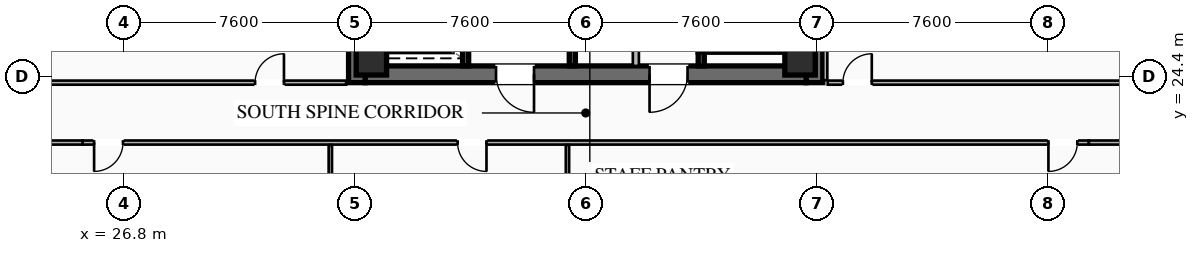
"""IFC4 building model, lengths in metres.
Left out: names, types, materials, properties, quantities, classifications, styles, units other than length and angle.
Written with IfcOpenShell. Run it as: python <this file> out.ifc"""

import sys

from ifc_helpers import new_model, si_unit, direction, frame, frame_2d, origin, origin_2d, place, context, subcontext, project, spatial, rectangle, hollow_rectangle, extrude, element, fill, save


model = new_model("IFC4")
c1 = context("Model", 3, precision=1e-05, world=origin(), true_north=direction((0.0, 1.0)))
c2 = subcontext(c1, "Body", "Model", "MODEL_VIEW")
j1 = project(units=[si_unit("LENGTHUNIT", "METRE"), si_unit("PLANEANGLEUNIT", "RADIAN")], contexts=[c1])
p1 = place(None, origin())
s1 = spatial("IfcSite", under=j1, at=p1, CompositionType="ELEMENT")
p2 = place(p1, origin())
s2 = spatial("IfcBuilding", under=s1, at=p2, CompositionType="ELEMENT")
p3 = place(p2, frame((0.0, 0.0, 149.9)))
s3 = spatial("IfcBuildingStorey", under=s2, at=p3, CompositionType="ELEMENT", Elevation=149.9)
for number, where, z_axis, x_axis in (
    (1, (34.475, 24.2, 0.0), (0.0, 0.0, 1.0), (0.0, 1.0, 0.0)),
    (2, (49.525, 39.8, 0.0), (0.0, 0.0, 1.0), (0.0, -1.0, 0.0)),
):
    element("IfcWall", number, at=place(p3, frame(where, z_axis=z_axis, x_axis=x_axis)), inside=s3, PredefinedType="SHEAR", context=c2, shape_type="SweptSolid", body=[
        extrude(rectangle(XDim=15.6, YDim=0.55, at=frame_2d((7.8, 0.0))), origin(), (0.0, 0.0, 1.0), 3.55),
    ])
p4 = place(p3, frame((49.25, 24.475, 0.0), z_axis=(0.0, 0.0, 1.0), x_axis=(-1.0, 0.0, 0.0)))
e3 = element("IfcWall", 3, at=p4, inside=s3, PredefinedType="SHEAR", context=c2, shape_type="SweptSolid", body=[
    extrude(rectangle(XDim=14.5, YDim=0.55, at=frame_2d((7.25, 0.0))), origin(), (0.0, 0.0, 1.0), 3.55),
])
p5 = place(p4, frame((8.95, 0.0, 0.0)))
e4 = element("IfcOpeningElement", 4, at=p5, cuts=e3, PredefinedType="OPENING", context=c2, shape_type="SweptSolid", body=[
    extrude(rectangle(XDim=1.25, YDim=2.25, at=frame_2d((0.625, 1.125))), frame((0.0, 0.285, 0.0), z_axis=(0.0, -1.0, 0.0), x_axis=(1.0, 0.0, 0.0)), (0.0, 0.0, 1.0), 0.57),
])
p6 = place(p4, frame((3.9, 0.0, 0.0)))
e5 = element("IfcOpeningElement", 5, at=p6, cuts=e3, PredefinedType="OPENING", context=c2, shape_type="SweptSolid", body=[
    extrude(rectangle(XDim=1.25, YDim=2.25, at=frame_2d((0.625, 1.125))), frame((0.0, 0.285, 0.0), z_axis=(0.0, -1.0, 0.0), x_axis=(1.0, 0.0, 0.0)), (0.0, 0.0, 1.0), 0.57),
])
for number, where, z_axis, x_axis in (
    (6, (34.95, 24.95, 0.0), (0.0, 0.0, 1.0), (1.0, 0.0, 0.0)),
    (7, (49.05, 24.95, 0.0), (0.0, 0.0, 1.0), (1.0, 0.0, 0.0)),
):
    element("IfcColumn", number, at=place(p3, frame(where, z_axis=z_axis, x_axis=x_axis)), inside=s3, PredefinedType="COLUMN", context=c2, shape_type="SweptSolid", body=[
        extrude(hollow_rectangle(XDim=1.0, YDim=1.0, WallThickness=0.04, at=origin_2d()), origin(), (0.0, 0.0, 1.0), 3.37),
    ])
p7 = place(p3, frame((45.8, 32.8, 0.0), z_axis=(0.0, 0.0, 1.0), x_axis=(0.0, -1.0, 0.0)))
e8 = element("IfcWall", 8, at=p7, inside=s3, PredefinedType="SHEAR", context=c2, shape_type="SweptSolid", body=[
    extrude(rectangle(XDim=8.05, YDim=0.2, at=frame_2d((4.025, 0.0))), origin(), (0.0, 0.0, 1.0), 3.37),
])
p8 = place(p7, frame((0.45, 0.0, 0.0)))
e9 = element("IfcOpeningElement", 9, at=p8, cuts=e8, PredefinedType="OPENING", context=c2, shape_type="SweptSolid", body=[
    extrude(rectangle(XDim=1.15, YDim=2.2, at=frame_2d((0.575, 1.1))), frame((0.0, 0.11, 0.0), z_axis=(0.0, -1.0, 0.0), x_axis=(1.0, 0.0, 0.0)), (0.0, 0.0, 1.0), 0.22),
])
p9 = place(p3, frame((41.56, 24.75, 0.0), z_axis=(0.0, 0.0, 1.0), x_axis=(0.0, 1.0, 0.0)))
e10 = element("IfcWall", 10, at=p9, inside=s3, PredefinedType="SHEAR", context=c2, shape_type="SweptSolid", body=[
    extrude(rectangle(XDim=14.5, YDim=0.2, at=frame_2d((7.25, 0.0))), origin(), (0.0, 0.0, 1.0), 3.37),
])
p10 = place(p3, frame((38.05, 24.75, 0.0), z_axis=(0.0, 0.0, 1.0), x_axis=(0.0, 1.0, 0.0)))
e11 = element("IfcWall", 11, at=p10, inside=s3, PredefinedType="SHEAR", context=c2, shape_type="SweptSolid", body=[
    extrude(rectangle(XDim=6.45, YDim=0.2, at=frame_2d((3.225, 0.0))), origin(), (0.0, 0.0, 1.0), 3.37),
])
p11 = place(p10, frame((4.875, 0.0, 0.0)))
e12 = element("IfcOpeningElement", 12, at=p11, cuts=e11, PredefinedType="OPENING", context=c2, shape_type="SweptSolid", body=[
    extrude(rectangle(XDim=1.3, YDim=2.25, at=frame_2d((0.65, 1.125))), frame((0.0, 0.11, 0.0), z_axis=(0.0, -1.0, 0.0), x_axis=(1.0, 0.0, 0.0)), (0.0, 0.0, 1.0), 0.22),
])
p12 = place(p10, frame((2.875, 0.0, 0.0)))
e13 = element("IfcOpeningElement", 13, at=p12, cuts=e11, PredefinedType="OPENING", context=c2, shape_type="SweptSolid", body=[
    extrude(rectangle(XDim=1.3, YDim=2.25, at=frame_2d((0.65, 1.125))), frame((0.0, 0.11, 0.0), z_axis=(0.0, -1.0, 0.0), x_axis=(1.0, 0.0, 0.0)), (0.0, 0.0, 1.0), 0.22),
])
p13 = place(p10, frame((0.675, 0.0, 0.0)))
e14 = element("IfcOpeningElement", 14, at=p13, cuts=e11, PredefinedType="OPENING", context=c2, shape_type="SweptSolid", body=[
    extrude(rectangle(XDim=1.3, YDim=2.25, at=frame_2d((0.65, 1.125))), frame((0.0, 0.11, 0.0), z_axis=(0.0, -1.0, 0.0), x_axis=(1.0, 0.0, 0.0)), (0.0, 0.0, 1.0), 0.22),
])
p14 = place(p3, frame((43.65, 24.75, 0.0), z_axis=(0.0, 0.0, 1.0), x_axis=(0.0, 1.0, 0.0)))
e15 = element("IfcWall", 15, at=p14, inside=s3, PredefinedType="SOLIDWALL", context=c2, shape_type="SweptSolid", body=[
    extrude(rectangle(XDim=6.9, YDim=0.2, at=frame_2d((3.45, 0.0))), origin(), (0.0, 0.0, 1.0), 2.723),
])
p15 = place(p14, frame((0.85, 0.0, 0.0)))
e16 = element("IfcOpeningElement", 16, at=p15, cuts=e15, PredefinedType="OPENING", context=c2, shape_type="SweptSolid", body=[
    extrude(rectangle(XDim=0.95, YDim=2.05, at=frame_2d((0.475, 1.025))), frame((0.0, 0.11, 0.0), z_axis=(0.0, -1.0, 0.0), x_axis=(1.0, 0.0, 0.0)), (0.0, 0.0, 1.0), 0.22),
])
p16 = place(p14, frame((4.8, 0.0, 0.0)))
e17 = element("IfcOpeningElement", 17, at=p16, cuts=e15, PredefinedType="OPENING", context=c2, shape_type="SweptSolid", body=[
    extrude(rectangle(XDim=1.05, YDim=2.2, at=frame_2d((0.525, 1.1))), frame((0.0, 0.11, 0.0), z_axis=(0.0, -1.0, 0.0), x_axis=(1.0, 0.0, 0.0)), (0.0, 0.0, 1.0), 0.22),
])
p17 = place(p3, frame((58.55, 22.23, 0.0), z_axis=(0.0, 0.0, 1.0), x_axis=(-1.0, 0.0, 0.0)))
e18 = element("IfcWall", 18, at=p17, inside=s3, PredefinedType="PARTITIONING", context=c2, shape_type="SweptSolid", body=[
    extrude(rectangle(XDim=33.1, YDim=0.135, at=frame_2d((16.55, 0.0))), origin(), (0.0, 0.0, 1.0), 2.723),
])
p18 = place(p17, frame((31.77, 0.0, 0.0)))
e19 = element("IfcOpeningElement", 19, at=p18, cuts=e18, PredefinedType="OPENING", context=c2, shape_type="SweptSolid", body=[
    extrude(rectangle(XDim=0.95, YDim=2.05, at=frame_2d((0.475, 1.025))), frame((0.0, 0.077, 0.0), z_axis=(0.0, -1.0, 0.0), x_axis=(1.0, 0.0, 0.0)), (0.0, 0.0, 1.0), 0.155),
])
p19 = place(p17, frame((19.814, 0.0, 0.0)))
e20 = element("IfcOpeningElement", 20, at=p19, cuts=e18, PredefinedType="OPENING", context=c2, shape_type="SweptSolid", body=[
    extrude(rectangle(XDim=0.95, YDim=2.05, at=frame_2d((0.475, 1.025))), frame((0.0, 0.077, 0.0), z_axis=(0.0, -1.0, 0.0), x_axis=(1.0, 0.0, 0.0)), (0.0, 0.0, 1.0), 0.155),
])
p20 = place(p17, frame((0.38, 0.0, 0.0)))
e21 = element("IfcOpeningElement", 21, at=p20, cuts=e18, PredefinedType="OPENING", context=c2, shape_type="SweptSolid", body=[
    extrude(rectangle(XDim=0.95, YDim=2.05, at=frame_2d((0.475, 1.025))), frame((0.0, 0.077, 0.0), z_axis=(0.0, -1.0, 0.0), x_axis=(1.0, 0.0, 0.0)), (0.0, 0.0, 1.0), 0.155),
])
for number, where, z_axis, x_axis in (
    (22, (22.72, 22.23, 0.0), (0.0, 0.0, 1.0), (1.0, 0.0, 0.0)),
    (23, (58.55, 22.23, 0.0), (0.0, 0.0, 1.0), (1.0, 0.0, 0.0)),
):
    element("IfcWall", number, at=place(p3, frame(where, z_axis=z_axis, x_axis=x_axis)), inside=s3, PredefinedType="PARTITIONING", context=c2, shape_type="SweptSolid", body=[
        extrude(rectangle(XDim=2.73, YDim=0.135, at=frame_2d((1.365, 0.0))), origin(), (0.0, 0.0, 1.0), 2.723),
    ])
for number, where, z_axis, x_axis in (
    (24, (33.6, 12.72, 0.0), (0.0, 0.0, 1.0), (0.0, 1.0, 0.0)),
    (25, (41.4, 12.72, 0.0), (0.0, 0.0, 1.0), (0.0, 1.0, 0.0)),
):
    element("IfcWall", number, at=place(p3, frame(where, z_axis=z_axis, x_axis=x_axis)), inside=s3, PredefinedType="PARTITIONING", context=c2, shape_type="SweptSolid", body=[
        extrude(rectangle(XDim=9.43, YDim=0.11, at=frame_2d((4.715, 0.0))), origin(), (0.0, 0.0, 1.0), 2.723),
    ])
p21 = place(p3, frame((49.88, 39.72, 0.0), z_axis=(0.0, 0.0, 1.0), x_axis=(0.0, -1.0, 0.0)))
e26 = element("IfcWall", 26, at=p21, inside=s3, PredefinedType="PARTITIONING", context=c2, shape_type="SweptSolid", body=[
    extrude(rectangle(XDim=15.44, YDim=0.135, at=frame_2d((7.72, 0.0))), origin(), (0.0, 0.0, 1.0), 2.723),
])
p22 = place(p3, frame((49.96, 24.2, 0.0), z_axis=(0.0, 0.0, 1.0), x_axis=(1.0, 0.0, 0.0)))
e27 = element("IfcWall", 27, at=p22, inside=s3, PredefinedType="PARTITIONING", context=c2, shape_type="SweptSolid", body=[
    extrude(rectangle(XDim=11.32, YDim=0.135, at=frame_2d((5.66, 0.0))), origin(), (0.0, 0.0, 1.0), 2.723),
])
p23 = place(p22, frame((0.5, 0.0, 0.0)))
e28 = element("IfcOpeningElement", 28, at=p23, cuts=e27, PredefinedType="OPENING", context=c2, shape_type="SweptSolid", body=[
    extrude(rectangle(XDim=0.95, YDim=2.05, at=frame_2d((0.475, 1.025))), frame((0.0, 0.077, 0.0), z_axis=(0.0, -1.0, 0.0), x_axis=(1.0, 0.0, 0.0)), (0.0, 0.0, 1.0), 0.155),
])
p24 = place(p3, frame((22.72, 24.2, 0.0), z_axis=(0.0, 0.0, 1.0), x_axis=(1.0, 0.0, 0.0)))
e29 = element("IfcWall", 29, at=p24, inside=s3, PredefinedType="PARTITIONING", context=c2, shape_type="SweptSolid", body=[
    extrude(rectangle(XDim=11.4, YDim=0.135, at=frame_2d((5.7, 0.0))), origin(), (0.0, 0.0, 1.0), 2.723),
])
p25 = place(p24, frame((8.405, 0.0, 0.0)))
e30 = element("IfcOpeningElement", 30, at=p25, cuts=e29, PredefinedType="OPENING", context=c2, shape_type="SweptSolid", body=[
    extrude(rectangle(XDim=0.95, YDim=2.05, at=frame_2d((0.475, 1.025))), frame((0.0, 0.077, 0.0), z_axis=(0.0, -1.0, 0.0), x_axis=(1.0, 0.0, 0.0)), (0.0, 0.0, 1.0), 0.155),
])
p26 = place(p5, origin())
e31 = element("IfcDoor", 31, at=p26, inside=s3, OperationType="SINGLE_SWING_LEFT", PredefinedType="DOOR", context=c2, shape_type="SweptSolid", body=[
    extrude(rectangle(XDim=1.25, YDim=2.25, at=frame_2d((0.625, 1.125))), frame((0.0, 0.025, 0.0), z_axis=(0.0, -1.0, 0.0), x_axis=(1.0, 0.0, 0.0)), (0.0, 0.0, 1.0), 0.05),
])
fill(e4, e31)
p27 = place(p6, origin())
e32 = element("IfcDoor", 32, at=p27, inside=s3, OperationType="SINGLE_SWING_RIGHT", PredefinedType="DOOR", context=c2, shape_type="SweptSolid", body=[
    extrude(rectangle(XDim=1.25, YDim=2.25, at=frame_2d((0.625, 1.125))), frame((0.0, 0.025, 0.0), z_axis=(0.0, -1.0, 0.0), x_axis=(1.0, 0.0, 0.0)), (0.0, 0.0, 1.0), 0.05),
])
fill(e5, e32)
p28 = place(p18, origin())
e33 = element("IfcDoor", 33, at=p28, inside=s3, OperationType="SINGLE_SWING_RIGHT", PredefinedType="DOOR", context=c2, shape_type="SweptSolid", body=[
    extrude(rectangle(XDim=0.95, YDim=2.05, at=frame_2d((0.475, 1.025))), frame((0.0, 0.025, 0.0), z_axis=(0.0, -1.0, 0.0), x_axis=(1.0, 0.0, 0.0)), (0.0, 0.0, 1.0), 0.05),
])
fill(e19, e33)
p29 = place(p19, origin())
e34 = element("IfcDoor", 34, at=p29, inside=s3, OperationType="SINGLE_SWING_LEFT", PredefinedType="DOOR", context=c2, shape_type="SweptSolid", body=[
    extrude(rectangle(XDim=0.95, YDim=2.05, at=frame_2d((0.475, 1.025))), frame((0.0, 0.025, 0.0), z_axis=(0.0, -1.0, 0.0), x_axis=(1.0, 0.0, 0.0)), (0.0, 0.0, 1.0), 0.05),
])
fill(e20, e34)
p30 = place(p20, origin())
e35 = element("IfcDoor", 35, at=p30, inside=s3, OperationType="SINGLE_SWING_RIGHT", PredefinedType="DOOR", context=c2, shape_type="SweptSolid", body=[
    extrude(rectangle(XDim=0.95, YDim=2.05, at=frame_2d((0.475, 1.025))), frame((0.0, 0.025, 0.0), z_axis=(0.0, -1.0, 0.0), x_axis=(1.0, 0.0, 0.0)), (0.0, 0.0, 1.0), 0.05),
])
fill(e21, e35)
p31 = place(p23, origin())
e36 = element("IfcDoor", 36, at=p31, inside=s3, OperationType="SINGLE_SWING_RIGHT", PredefinedType="DOOR", context=c2, shape_type="SweptSolid", body=[
    extrude(rectangle(XDim=0.95, YDim=2.05, at=frame_2d((0.475, 1.025))), frame((0.0, 0.025, 0.0), z_axis=(0.0, -1.0, 0.0), x_axis=(1.0, 0.0, 0.0)), (0.0, 0.0, 1.0), 0.05),
])
fill(e28, e36)
p32 = place(p25, origin())
e37 = element("IfcDoor", 37, at=p32, inside=s3, OperationType="SINGLE_SWING_RIGHT", PredefinedType="DOOR", context=c2, shape_type="SweptSolid", body=[
    extrude(rectangle(XDim=0.95, YDim=2.05, at=frame_2d((0.475, 1.025))), frame((0.0, 0.025, 0.0), z_axis=(0.0, -1.0, 0.0), x_axis=(1.0, 0.0, 0.0)), (0.0, 0.0, 1.0), 0.05),
])
fill(e30, e37)
save(model, sys.argv[1])
